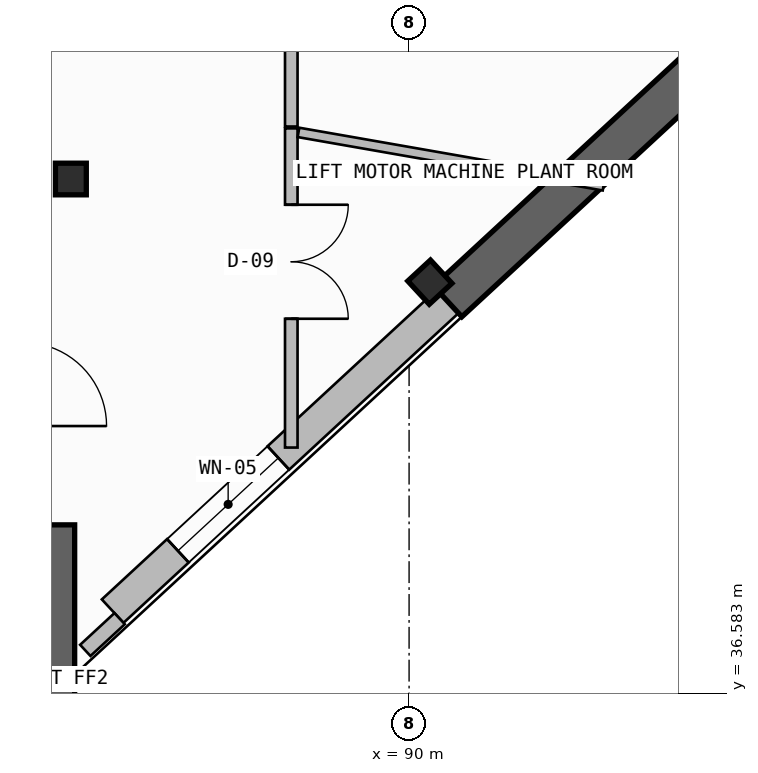
"""IFC4 building model, lengths in metres.
Left out: names, types, materials, properties, quantities, classifications, styles, units other than length and angle.
Written with IfcOpenShell. Run it as: python <this file> out.ifc"""

import sys

from ifc_helpers import new_model, si_unit, direction, frame, frame_2d, origin, origin_2d, place, context, subcontext, project, spatial, polyline, rectangle, i_section, outline, extrude, element, fill, save


model = new_model("IFC4")
c1 = context("Model", 3, precision=1e-05, world=origin(), true_north=direction((0.0, 1.0)))
c2 = subcontext(c1, "Body", "Model", "MODEL_VIEW")
j1 = project(units=[si_unit("LENGTHUNIT", "METRE"), si_unit("PLANEANGLEUNIT", "RADIAN")], contexts=[c1])
p1 = place(None, origin())
s1 = spatial("IfcSite", under=j1, at=p1, CompositionType="ELEMENT")
p2 = place(p1, origin())
s2 = spatial("IfcBuilding", under=s1, at=p2, CompositionType="ELEMENT")
p3 = place(p2, frame((0.0, 0.0, 307.78)))
s3 = spatial("IfcBuildingStorey", under=s2, at=p3, CompositionType="ELEMENT", Elevation=307.78)
p4 = place(p3, frame((85.3, 35.5, -0.2), z_axis=(0.0, 0.0, 1.0), x_axis=(0.0, 1.0, 0.0)))
e1 = element("IfcWall", 1, at=p4, inside=s3, PredefinedType="SHEAR", context=c2, shape_type="SweptSolid", body=[
    extrude(rectangle(XDim=3.3, YDim=0.6, at=frame_2d((1.65, 0.0))), origin(), (0.0, 0.0, 1.0), 4.8),
])
for number, where, z_axis, x_axis in (
    (2, (85.55, 43.35, 0.0), (0.0, 0.0, 1.0), (1.0, 0.0, 0.0)),
    (3, (90.273, 41.993, 0.0), (0.0, 0.0, 1.0), (0.734, 0.679, 0.0)),
):
    element("IfcColumn", number, at=place(p3, frame(where, z_axis=z_axis, x_axis=x_axis)), inside=s3, PredefinedType="COLUMN", context=c2, shape_type="SweptSolid", body=[
        extrude(i_section(OverallWidth=0.406, OverallDepth=0.416, WebThickness=0.03, FlangeThickness=0.048, FilletRadius=0.015, at=origin_2d()), origin(), (0.0, 0.0, 1.0), 4.8),
    ])
p5 = place(p3, frame((86.1, 37.665, 0.0), z_axis=(0.0, 0.0, 1.0), x_axis=(0.734321413343, 0.678801931277, 0.0)))
e4 = element("IfcWall", 4, at=p5, inside=s3, PredefinedType="SOLIDWALL", context=c2, shape_type="SweptSolid", body=[
    extrude(outline(polyline([(0.0, 0.0), (6.002, 0.0), (6.002, 4.6), (0.0, 4.6), (0.0, 0.0)])), frame((0.0, 0.21, 0.0), z_axis=(0.0, -1.0, 0.0), x_axis=(1.0, 0.0, 0.0)), (0.0, 0.0, 1.0), 0.42),
])
p6 = place(p5, frame((1.169, 0.0, 0.7)))
e5 = element("IfcOpeningElement", 5, at=p6, cuts=e4, PredefinedType="OPENING", context=c2, shape_type="SweptSolid", body=[
    extrude(rectangle(XDim=1.8, YDim=1.2, at=frame_2d((0.9, 0.6))), frame((0.0, 0.22, 0.0), z_axis=(0.0, -1.0, 0.0), x_axis=(1.0, 0.0, 0.0)), (0.0, 0.0, 1.0), 0.44),
])
p7 = place(p3, frame((90.508, 41.74, -0.2), z_axis=(0.0, 0.0, 1.0), x_axis=(0.734315848115, 0.678807951638, 0.0)))
e6 = element("IfcWall", 6, at=p7, inside=s3, PredefinedType="SHEAR", context=c2, shape_type="SweptSolid", body=[
    extrude(outline(polyline([(0.0, 0.0), (16.573, 0.0), (16.573, 4.8), (0.0, 4.8), (0.0, 0.0)])), frame((0.0, 0.275, 0.0), z_axis=(0.0, -1.0, 0.0), x_axis=(1.0, 0.0, 0.0)), (0.0, 0.0, 1.0), 0.55),
])
p8 = place(p7, frame((10.654, 0.0, 0.7)))
e7 = element("IfcOpeningElement", 7, at=p8, cuts=e6, PredefinedType="OPENING", context=c2, shape_type="SweptSolid", body=[
    extrude(rectangle(XDim=1.8, YDim=1.2, at=frame_2d((0.9, 0.6))), frame((0.0, 0.285, 0.0), z_axis=(0.0, -1.0, 0.0), x_axis=(1.0, 0.0, 0.0)), (0.0, 0.0, 1.0), 0.57),
])
p9 = place(p3, frame((86.192, 37.566, 0.0), z_axis=(0.0, 0.0, 1.0), x_axis=(-0.734346728958, -0.678774544064, 0.0)))
e8 = element("IfcWall", 8, at=p9, inside=s3, PredefinedType="PARAPET", context=c2, shape_type="SweptSolid", body=[
    extrude(rectangle(XDim=0.615, YDim=0.2, at=frame_2d((0.308, 0.0))), origin(), (0.0, 0.0, 1.0), 1.15),
])
p10 = place(p3, frame((88.45, 39.817, 0.0), z_axis=(0.0, 0.0, 1.0), x_axis=(0.0, 1.0, 0.0)))
e9 = element("IfcWall", 9, at=p10, inside=s3, PredefinedType="PARTITIONING", context=c2, shape_type="SweptSolid", body=[
    extrude(rectangle(XDim=4.199, YDim=0.165, at=frame_2d((2.1, 0.0))), origin(), (0.0, 0.0, 1.0), 4.085),
])
p11 = place(p10, frame((1.695, 0.0, 0.0)))
e10 = element("IfcOpeningElement", 10, at=p11, cuts=e9, PredefinedType="OPENING", context=c2, shape_type="SweptSolid", body=[
    extrude(rectangle(XDim=1.5, YDim=2.25, at=frame_2d((0.75, 1.125))), frame((0.0, 0.093, 0.0), z_axis=(0.0, -1.0, 0.0), x_axis=(1.0, 0.0, 0.0)), (0.0, 0.0, 1.0), 0.185),
])
p12 = place(p3, frame((88.544, 43.963, 0.0), z_axis=(0.0, 0.0, 1.0), x_axis=(0.985023854279, -0.172418115352, 0.0)))
e11 = element("IfcWall", 11, at=p12, inside=s3, PredefinedType="PARTITIONING", context=c2, shape_type="SweptSolid", body=[
    extrude(rectangle(XDim=4.075, YDim=0.125, at=frame_2d((2.038, 0.0))), origin(), (0.0, 0.0, 1.0), 3.585),
])
p13 = place(p3, frame((88.45, 44.041, 0.0), z_axis=(0.0, 0.0, 1.0), x_axis=(0.0, 1.0, 0.0)))
e12 = element("IfcWall", 12, at=p13, inside=s3, PredefinedType="PARTITIONING", context=c2, shape_type="SweptSolid", body=[
    extrude(rectangle(XDim=15.31, YDim=0.165, at=frame_2d((7.655, 0.0))), origin(), (0.0, 0.0, 1.0), 2.12),
])
p14 = place(p13, frame((7.23, 0.0, 0.0)))
e13 = element("IfcOpeningElement", 13, at=p14, cuts=e12, PredefinedType="OPENING", context=c2, shape_type="SweptSolid", body=[
    extrude(rectangle(XDim=0.85, YDim=2.05, at=frame_2d((0.425, 1.025))), frame((0.0, 0.093, 0.0), z_axis=(0.0, -1.0, 0.0), x_axis=(1.0, 0.0, 0.0)), (0.0, 0.0, 1.0), 0.185),
])
p15 = place(p6, origin())
e14 = element("IfcWindow", 14, at=p15, inside=s3, PartitioningType="SINGLE_PANEL", PredefinedType="WINDOW", context=c2, shape_type="SweptSolid", body=[
    extrude(rectangle(XDim=1.8, YDim=1.2, at=frame_2d((0.9, 0.6))), frame((0.0, 0.03, 0.0), z_axis=(0.0, -1.0, 0.0), x_axis=(1.0, 0.0, 0.0)), (0.0, 0.0, 1.0), 0.06),
])
fill(e5, e14)
p16 = place(p11, frame((1.5, 0.0, 0.0), z_axis=(0.0, 0.0, 1.0), x_axis=(-1.0, 0.0, 0.0)))
e15 = element("IfcDoor", 15, at=p16, inside=s3, OperationType="DOUBLE_DOOR_SINGLE_SWING", PredefinedType="DOOR", context=c2, shape_type="SweptSolid", body=[
    extrude(rectangle(XDim=1.5, YDim=2.25, at=frame_2d((0.75, 1.125))), frame((0.0, 0.025, 0.0), z_axis=(0.0, -1.0, 0.0), x_axis=(1.0, 0.0, 0.0)), (0.0, 0.0, 1.0), 0.05),
])
fill(e10, e15)
save(model, sys.argv[1])
